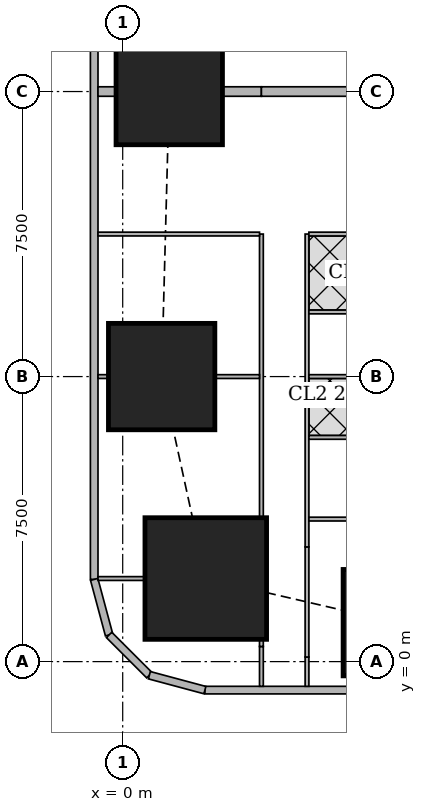
"""IFC4 building model, lengths in metres.
Left out: names, types, materials, properties, quantities, classifications, styles, units other than length and angle.
Written with IfcOpenShell. Run it as: python <this file> out.ifc"""

import sys

from ifc_helpers import new_model, si_unit, direction, frame, frame_2d, origin, origin_2d, place, context, subcontext, project, spatial, rectangle, extrude, element, fill, save


model = new_model("IFC4")
c1 = context("Model", 3, precision=1e-05, world=origin(), true_north=direction((0.0, 1.0)))
c2 = subcontext(c1, "Body", "Model", "MODEL_VIEW")
j1 = project(units=[si_unit("LENGTHUNIT", "METRE"), si_unit("PLANEANGLEUNIT", "RADIAN")], contexts=[c1])
p1 = place(None, origin())
s1 = spatial("IfcSite", under=j1, at=p1, CompositionType="ELEMENT")
p2 = place(p1, origin())
s2 = spatial("IfcBuilding", under=s1, at=p2, CompositionType="ELEMENT")
p3 = place(p2, frame((0.0, 0.0, 42.5)))
s3 = spatial("IfcBuildingStorey", under=s2, at=p3, CompositionType="ELEMENT", Elevation=42.5)
p4 = place(p3, frame((7.2, 1.025, 0.0), z_axis=(0.0, 0.0, 1.0), x_axis=(1.0, 0.0, 0.0)))
e1 = element("IfcColumn", 1, at=p4, inside=s3, PredefinedType="COLUMN", context=c2, shape_type="SweptSolid", body=[
    extrude(rectangle(XDim=2.8, YDim=2.8, at=origin_2d()), origin(), (0.0, 0.0, 1.0), 3.75),
])
p5 = place(p3, frame((2.186, 2.186, 0.0), z_axis=(0.0, 0.0, 1.0), x_axis=(1.0, 0.0, 0.0)))
e2 = element("IfcColumn", 2, at=p5, inside=s3, PredefinedType="COLUMN", context=c2, shape_type="SweptSolid", body=[
    extrude(rectangle(XDim=3.2, YDim=3.2, at=origin_2d()), origin(), (0.0, 0.0, 1.0), 3.75),
])
for number, where, z_axis, x_axis in (
    (3, (1.025, 7.5, 0.0), (0.0, 0.0, 1.0), (1.0, 0.0, 0.0)),
    (4, (1.225, 15.0, 0.0), (0.0, 0.0, 1.0), (1.0, 0.0, 0.0)),
):
    element("IfcColumn", number, at=place(p3, frame(where, z_axis=z_axis, x_axis=x_axis)), inside=s3, PredefinedType="COLUMN", context=c2, shape_type="SweptSolid", body=[
        extrude(rectangle(XDim=2.8, YDim=2.8, at=origin_2d()), origin(), (0.0, 0.0, 1.0), 3.75),
    ])
p6 = place(p3, frame((2.163, -0.75, 0.0), z_axis=(0.0, 0.0, 1.0), x_axis=(1.0, 0.0, 0.0)))
e5 = element("IfcWall", 5, at=p6, inside=s3, PredefinedType="SOLIDWALL", context=c2, shape_type="SweptSolid", body=[
    extrude(rectangle(XDim=45.628, YDim=0.2, at=frame_2d((22.814, 0.0))), origin(), (0.0, 0.0, 1.0), 3.5),
])
p7 = place(p6, frame((9.537, 0.0, 0.9)))
e6 = element("IfcOpeningElement", 6, at=p7, cuts=e5, PredefinedType="OPENING", context=c2, shape_type="SweptSolid", body=[
    extrude(rectangle(XDim=1.8, YDim=1.5, at=frame_2d((0.9, 0.75))), frame((0.0, 0.11, 0.0), z_axis=(0.0, -1.0, 0.0), x_axis=(1.0, 0.0, 0.0)), (0.0, 0.0, 1.0), 0.22),
])
p8 = place(p6, frame((13.137, 0.0, 0.9)))
e7 = element("IfcOpeningElement", 7, at=p8, cuts=e5, PredefinedType="OPENING", context=c2, shape_type="SweptSolid", body=[
    extrude(rectangle(XDim=1.8, YDim=1.5, at=frame_2d((0.9, 0.75))), frame((0.0, 0.11, 0.0), z_axis=(0.0, -1.0, 0.0), x_axis=(1.0, 0.0, 0.0)), (0.0, 0.0, 1.0), 0.22),
])
p9 = place(p6, frame((16.737, 0.0, 0.9)))
e8 = element("IfcOpeningElement", 8, at=p9, cuts=e5, PredefinedType="OPENING", context=c2, shape_type="SweptSolid", body=[
    extrude(rectangle(XDim=1.8, YDim=1.5, at=frame_2d((0.9, 0.75))), frame((0.0, 0.11, 0.0), z_axis=(0.0, -1.0, 0.0), x_axis=(1.0, 0.0, 0.0)), (0.0, 0.0, 1.0), 0.22),
])
p10 = place(p6, frame((20.337, 0.0, 0.9)))
e9 = element("IfcOpeningElement", 9, at=p10, cuts=e5, PredefinedType="OPENING", context=c2, shape_type="SweptSolid", body=[
    extrude(rectangle(XDim=1.8, YDim=1.5, at=frame_2d((0.9, 0.75))), frame((0.0, 0.11, 0.0), z_axis=(0.0, -1.0, 0.0), x_axis=(1.0, 0.0, 0.0)), (0.0, 0.0, 1.0), 0.22),
])
p11 = place(p6, frame((23.937, 0.0, 0.9)))
e10 = element("IfcOpeningElement", 10, at=p11, cuts=e5, PredefinedType="OPENING", context=c2, shape_type="SweptSolid", body=[
    extrude(rectangle(XDim=1.8, YDim=1.5, at=frame_2d((0.9, 0.75))), frame((0.0, 0.11, 0.0), z_axis=(0.0, -1.0, 0.0), x_axis=(1.0, 0.0, 0.0)), (0.0, 0.0, 1.0), 0.22),
])
p12 = place(p6, frame((27.537, 0.0, 0.9)))
e11 = element("IfcOpeningElement", 11, at=p12, cuts=e5, PredefinedType="OPENING", context=c2, shape_type="SweptSolid", body=[
    extrude(rectangle(XDim=1.8, YDim=1.5, at=frame_2d((0.9, 0.75))), frame((0.0, 0.11, 0.0), z_axis=(0.0, -1.0, 0.0), x_axis=(1.0, 0.0, 0.0)), (0.0, 0.0, 1.0), 0.22),
])
p13 = place(p6, frame((31.137, 0.0, 0.9)))
e12 = element("IfcOpeningElement", 12, at=p13, cuts=e5, PredefinedType="OPENING", context=c2, shape_type="SweptSolid", body=[
    extrude(rectangle(XDim=1.8, YDim=1.5, at=frame_2d((0.9, 0.75))), frame((0.0, 0.11, 0.0), z_axis=(0.0, -1.0, 0.0), x_axis=(1.0, 0.0, 0.0)), (0.0, 0.0, 1.0), 0.22),
])
p14 = place(p6, frame((34.737, 0.0, 0.9)))
e13 = element("IfcOpeningElement", 13, at=p14, cuts=e5, PredefinedType="OPENING", context=c2, shape_type="SweptSolid", body=[
    extrude(rectangle(XDim=1.8, YDim=1.5, at=frame_2d((0.9, 0.75))), frame((0.0, 0.11, 0.0), z_axis=(0.0, -1.0, 0.0), x_axis=(1.0, 0.0, 0.0)), (0.0, 0.0, 1.0), 0.22),
])
p15 = place(p3, frame((-0.75, 42.837, 0.0), z_axis=(0.0, 0.0, 1.0), x_axis=(0.0, -1.0, 0.0)))
e14 = element("IfcWall", 14, at=p15, inside=s3, PredefinedType="SOLIDWALL", context=c2, shape_type="SweptSolid", body=[
    extrude(rectangle(XDim=40.674, YDim=0.2, at=frame_2d((20.337, 0.0))), origin(), (0.0, 0.0, 1.0), 3.5),
])
p16 = place(p15, frame((1.78, 0.0, 0.9)))
e15 = element("IfcOpeningElement", 15, at=p16, cuts=e14, PredefinedType="OPENING", context=c2, shape_type="SweptSolid", body=[
    extrude(rectangle(XDim=1.8, YDim=1.5, at=frame_2d((0.9, 0.75))), frame((0.0, 0.11, 0.0), z_axis=(0.0, -1.0, 0.0), x_axis=(1.0, 0.0, 0.0)), (0.0, 0.0, 1.0), 0.22),
])
p17 = place(p15, frame((6.312, 0.0, 0.9)))
e16 = element("IfcOpeningElement", 16, at=p17, cuts=e14, PredefinedType="OPENING", context=c2, shape_type="SweptSolid", body=[
    extrude(rectangle(XDim=1.8, YDim=1.5, at=frame_2d((0.9, 0.75))), frame((0.0, 0.11, 0.0), z_axis=(0.0, -1.0, 0.0), x_axis=(1.0, 0.0, 0.0)), (0.0, 0.0, 1.0), 0.22),
])
p18 = place(p15, frame((10.062, 0.0, 0.9)))
e17 = element("IfcOpeningElement", 17, at=p18, cuts=e14, PredefinedType="OPENING", context=c2, shape_type="SweptSolid", body=[
    extrude(rectangle(XDim=1.8, YDim=1.5, at=frame_2d((0.9, 0.75))), frame((0.0, 0.11, 0.0), z_axis=(0.0, -1.0, 0.0), x_axis=(1.0, 0.0, 0.0)), (0.0, 0.0, 1.0), 0.22),
])
p19 = place(p15, frame((13.812, 0.0, 0.9)))
e18 = element("IfcOpeningElement", 18, at=p19, cuts=e14, PredefinedType="OPENING", context=c2, shape_type="SweptSolid", body=[
    extrude(rectangle(XDim=1.8, YDim=1.5, at=frame_2d((0.9, 0.75))), frame((0.0, 0.11, 0.0), z_axis=(0.0, -1.0, 0.0), x_axis=(1.0, 0.0, 0.0)), (0.0, 0.0, 1.0), 0.22),
])
p20 = place(p15, frame((17.562, 0.0, 0.9)))
e19 = element("IfcOpeningElement", 19, at=p20, cuts=e14, PredefinedType="OPENING", context=c2, shape_type="SweptSolid", body=[
    extrude(rectangle(XDim=1.8, YDim=1.5, at=frame_2d((0.9, 0.75))), frame((0.0, 0.11, 0.0), z_axis=(0.0, -1.0, 0.0), x_axis=(1.0, 0.0, 0.0)), (0.0, 0.0, 1.0), 0.22),
])
p21 = place(p15, frame((21.312, 0.0, 0.9)))
e20 = element("IfcOpeningElement", 20, at=p21, cuts=e14, PredefinedType="OPENING", context=c2, shape_type="SweptSolid", body=[
    extrude(rectangle(XDim=1.8, YDim=1.5, at=frame_2d((0.9, 0.75))), frame((0.0, 0.11, 0.0), z_axis=(0.0, -1.0, 0.0), x_axis=(1.0, 0.0, 0.0)), (0.0, 0.0, 1.0), 0.22),
])
p22 = place(p15, frame((25.062, 0.0, 0.9)))
e21 = element("IfcOpeningElement", 21, at=p22, cuts=e14, PredefinedType="OPENING", context=c2, shape_type="SweptSolid", body=[
    extrude(rectangle(XDim=1.8, YDim=1.5, at=frame_2d((0.9, 0.75))), frame((0.0, 0.11, 0.0), z_axis=(0.0, -1.0, 0.0), x_axis=(1.0, 0.0, 0.0)), (0.0, 0.0, 1.0), 0.22),
])
p23 = place(p15, frame((28.812, 0.0, 0.9)))
e22 = element("IfcOpeningElement", 22, at=p23, cuts=e14, PredefinedType="OPENING", context=c2, shape_type="SweptSolid", body=[
    extrude(rectangle(XDim=1.8, YDim=1.5, at=frame_2d((0.9, 0.75))), frame((0.0, 0.11, 0.0), z_axis=(0.0, -1.0, 0.0), x_axis=(1.0, 0.0, 0.0)), (0.0, 0.0, 1.0), 0.22),
])
p24 = place(p15, frame((32.562, 0.0, 0.9)))
e23 = element("IfcOpeningElement", 23, at=p24, cuts=e14, PredefinedType="OPENING", context=c2, shape_type="SweptSolid", body=[
    extrude(rectangle(XDim=1.8, YDim=1.5, at=frame_2d((0.9, 0.75))), frame((0.0, 0.11, 0.0), z_axis=(0.0, -1.0, 0.0), x_axis=(1.0, 0.0, 0.0)), (0.0, 0.0, 1.0), 0.22),
])
p25 = place(p15, frame((37.094, 0.0, 0.9)))
e24 = element("IfcOpeningElement", 24, at=p25, cuts=e14, PredefinedType="OPENING", context=c2, shape_type="SweptSolid", body=[
    extrude(rectangle(XDim=1.8, YDim=1.5, at=frame_2d((0.9, 0.75))), frame((0.0, 0.11, 0.0), z_axis=(0.0, -1.0, 0.0), x_axis=(1.0, 0.0, 0.0)), (0.0, 0.0, 1.0), 0.22),
])
p26 = place(p3, frame((-0.75, 2.163, 0.0), z_axis=(0.0, 0.0, 1.0), x_axis=(0.259168954497, -0.965832000415, 0.0)))
e25 = element("IfcWall", 25, at=p26, inside=s3, PredefinedType="SOLIDWALL", context=c2, shape_type="SweptSolid", body=[
    extrude(rectangle(XDim=1.513, YDim=0.2, at=frame_2d((0.756, 0.0))), origin(), (0.0, 0.0, 1.0), 3.5),
])
p27 = place(p3, frame((-0.358, 0.702, 0.0), z_axis=(0.0, 0.0, 1.0), x_axis=(0.707106781187, -0.707106781187, 0.0)))
e26 = element("IfcWall", 26, at=p27, inside=s3, PredefinedType="SOLIDWALL", context=c2, shape_type="SweptSolid", body=[
    extrude(rectangle(XDim=1.499, YDim=0.2, at=frame_2d((0.75, 0.0))), origin(), (0.0, 0.0, 1.0), 3.5),
])
p28 = place(p3, frame((0.702, -0.358, 0.0), z_axis=(0.0, 0.0, 1.0), x_axis=(0.965832000415, -0.259168954497, 0.0)))
e27 = element("IfcWall", 27, at=p28, inside=s3, PredefinedType="SOLIDWALL", context=c2, shape_type="SweptSolid", body=[
    extrude(rectangle(XDim=1.513, YDim=0.2, at=frame_2d((0.756, 0.0))), origin(), (0.0, 0.0, 1.0), 3.5),
])
p29 = place(p3, frame((3.65, -0.65, 0.0), z_axis=(0.0, 0.0, 1.0), x_axis=(0.0, 1.0, 0.0)))
e28 = element("IfcWall", 28, at=p29, inside=s3, PredefinedType="PARTITIONING", context=c2, shape_type="SweptSolid", body=[
    extrude(rectangle(XDim=1.048, YDim=0.1, at=frame_2d((0.524, 0.0))), origin(), (0.0, 0.0, 1.0), 3.5),
])
p30 = place(p3, frame((3.65, 0.398, 0.0), z_axis=(0.0, 0.0, 1.0), x_axis=(0.0, 1.0, 0.0)))
e29 = element("IfcWall", 29, at=p30, inside=s3, PredefinedType="PARTITIONING", context=c2, shape_type="SweptSolid", body=[
    extrude(rectangle(XDim=0.187, YDim=0.1, at=frame_2d((0.094, 0.0))), origin(), (0.0, 0.0, 1.0), 2.05),
])
p31 = place(p3, frame((3.65, 3.787, 0.0), z_axis=(0.0, 0.0, 1.0), x_axis=(0.0, 1.0, 0.0)))
e30 = element("IfcWall", 30, at=p31, inside=s3, PredefinedType="PARTITIONING", context=c2, shape_type="SweptSolid", body=[
    extrude(rectangle(XDim=7.463, YDim=0.1, at=frame_2d((3.731, 0.0))), origin(), (0.0, 0.0, 1.0), 3.5),
])
p32 = place(p31, frame((6.363, 0.0, 0.0)))
e31 = element("IfcOpeningElement", 31, at=p32, cuts=e30, PredefinedType="OPENING", context=c2, shape_type="SweptSolid", body=[
    extrude(rectangle(XDim=0.9, YDim=2.1, at=frame_2d((0.45, 1.05))), frame((0.0, 0.06, 0.0), z_axis=(0.0, -1.0, 0.0), x_axis=(1.0, 0.0, 0.0)), (0.0, 0.0, 1.0), 0.12),
])
p33 = place(p31, frame((1.4, 0.0, 0.0)))
e32 = element("IfcOpeningElement", 32, at=p33, cuts=e30, PredefinedType="OPENING", context=c2, shape_type="SweptSolid", body=[
    extrude(rectangle(XDim=0.9, YDim=2.1, at=frame_2d((0.45, 1.05))), frame((0.0, 0.06, 0.0), z_axis=(0.0, -1.0, 0.0), x_axis=(1.0, 0.0, 0.0)), (0.0, 0.0, 1.0), 0.12),
])
p34 = place(p3, frame((4.85, -0.65, 0.0), z_axis=(0.0, 0.0, 1.0), x_axis=(0.0, 1.0, 0.0)))
e33 = element("IfcWall", 33, at=p34, inside=s3, PredefinedType="PARTITIONING", context=c2, shape_type="SweptSolid", body=[
    extrude(rectangle(XDim=0.771, YDim=0.1, at=frame_2d((0.385, 0.0))), origin(), (0.0, 0.0, 1.0), 3.5),
])
p35 = place(p3, frame((4.85, 0.121, 0.0), z_axis=(0.0, 0.0, 1.0), x_axis=(0.0, 1.0, 0.0)))
e34 = element("IfcWall", 34, at=p35, inside=s3, PredefinedType="PARTITIONING", context=c2, shape_type="SweptSolid", body=[
    extrude(rectangle(XDim=2.897, YDim=0.1, at=frame_2d((1.448, 0.0))), origin(), (0.0, 0.0, 1.0), 2.05),
])
p36 = place(p3, frame((4.85, 3.018, 0.0), z_axis=(0.0, 0.0, 1.0), x_axis=(0.0, 1.0, 0.0)))
e35 = element("IfcWall", 35, at=p36, inside=s3, PredefinedType="PARTITIONING", context=c2, shape_type="SweptSolid", body=[
    extrude(rectangle(XDim=8.232, YDim=0.1, at=frame_2d((4.116, 0.0))), origin(), (0.0, 0.0, 1.0), 3.5),
])
p37 = place(p36, frame((6.757, 0.0, 0.0)))
e36 = element("IfcOpeningElement", 36, at=p37, cuts=e35, PredefinedType="OPENING", context=c2, shape_type="SweptSolid", body=[
    extrude(rectangle(XDim=0.9, YDim=2.1, at=frame_2d((0.45, 1.05))), frame((0.0, 0.06, 0.0), z_axis=(0.0, -1.0, 0.0), x_axis=(1.0, 0.0, 0.0)), (0.0, 0.0, 1.0), 0.12),
])
p38 = place(p36, frame((3.232, 0.0, 0.0)))
e37 = element("IfcOpeningElement", 37, at=p38, cuts=e35, PredefinedType="OPENING", context=c2, shape_type="SweptSolid", body=[
    extrude(rectangle(XDim=0.9, YDim=2.1, at=frame_2d((0.45, 1.05))), frame((0.0, 0.06, 0.0), z_axis=(0.0, -1.0, 0.0), x_axis=(1.0, 0.0, 0.0)), (0.0, 0.0, 1.0), 0.12),
])
p39 = place(p36, frame((4.882, 0.0, 0.0)))
e38 = element("IfcOpeningElement", 38, at=p39, cuts=e35, PredefinedType="OPENING", context=c2, shape_type="SweptSolid", body=[
    extrude(rectangle(XDim=0.9, YDim=2.1, at=frame_2d((0.45, 1.05))), frame((0.0, 0.06, 0.0), z_axis=(0.0, -1.0, 0.0), x_axis=(1.0, 0.0, 0.0)), (0.0, 0.0, 1.0), 0.12),
])
p40 = place(p36, frame((1.357, 0.0, 0.0)))
e39 = element("IfcOpeningElement", 39, at=p40, cuts=e35, PredefinedType="OPENING", context=c2, shape_type="SweptSolid", body=[
    extrude(rectangle(XDim=0.9, YDim=2.1, at=frame_2d((0.45, 1.05))), frame((0.0, 0.06, 0.0), z_axis=(0.0, -1.0, 0.0), x_axis=(1.0, 0.0, 0.0)), (0.0, 0.0, 1.0), 0.12),
])
p41 = place(p3, frame((-0.65, 2.186, 0.0), z_axis=(0.0, 0.0, 1.0), x_axis=(1.0, 0.0, 0.0)))
e40 = element("IfcWall", 40, at=p41, inside=s3, PredefinedType="PARTITIONING", context=c2, shape_type="SweptSolid", body=[
    extrude(rectangle(XDim=1.235, YDim=0.1, at=frame_2d((0.617, 0.0))), origin(), (0.0, 0.0, 1.0), 3.5),
])
p42 = place(p3, frame((-0.65, 7.5, 0.0), z_axis=(0.0, 0.0, 1.0), x_axis=(1.0, 0.0, 0.0)))
e41 = element("IfcWall", 41, at=p42, inside=s3, PredefinedType="PARTITIONING", context=c2, shape_type="SweptSolid", body=[
    extrude(rectangle(XDim=0.274, YDim=0.1, at=frame_2d((0.137, 0.0))), origin(), (0.0, 0.0, 1.0), 3.5),
])
p43 = place(p3, frame((2.426, 7.5, 0.0), z_axis=(0.0, 0.0, 1.0), x_axis=(1.0, 0.0, 0.0)))
e42 = element("IfcWall", 42, at=p43, inside=s3, PredefinedType="PARTITIONING", context=c2, shape_type="SweptSolid", body=[
    extrude(rectangle(XDim=1.174, YDim=0.1, at=frame_2d((0.587, 0.0))), origin(), (0.0, 0.0, 1.0), 2.05),
])
p44 = place(p3, frame((-0.65, 11.25, 0.0), z_axis=(0.0, 0.0, 1.0), x_axis=(1.0, 0.0, 0.0)))
e43 = element("IfcWall", 43, at=p44, inside=s3, PredefinedType="PARTITIONING", context=c2, shape_type="SweptSolid", body=[
    extrude(rectangle(XDim=4.25, YDim=0.1, at=frame_2d((2.125, 0.0))), origin(), (0.0, 0.0, 1.0), 2.05),
])
p45 = place(p3, frame((4.9, 3.75, 0.0), z_axis=(0.0, 0.0, 1.0), x_axis=(1.0, 0.0, 0.0)))
e44 = element("IfcWall", 44, at=p45, inside=s3, PredefinedType="PARTITIONING", context=c2, shape_type="SweptSolid", body=[
    extrude(rectangle(XDim=3.525, YDim=0.1, at=frame_2d((1.763, 0.0))), origin(), (0.0, 0.0, 1.0), 3.5),
])
p46 = place(p3, frame((4.9, 7.5, 0.0), z_axis=(0.0, 0.0, 1.0), x_axis=(1.0, 0.0, 0.0)))
e45 = element("IfcWall", 45, at=p46, inside=s3, PredefinedType="PARTITIONING", context=c2, shape_type="SweptSolid", body=[
    extrude(rectangle(XDim=1.399, YDim=0.1, at=frame_2d((0.7, 0.0))), origin(), (0.0, 0.0, 1.0), 3.5),
])
for number, where, z_axis, x_axis in (
    (46, (4.9, 11.25, 0.0), (0.0, 0.0, 1.0), (1.0, 0.0, 0.0)),
    (47, (4.9, 9.2, 0.0), (0.0, 0.0, 1.0), (1.0, 0.0, 0.0)),
    (48, (4.9, 5.9, 0.0), (0.0, 0.0, 1.0), (1.0, 0.0, 0.0)),
):
    element("IfcWall", number, at=place(p3, frame(where, z_axis=z_axis, x_axis=x_axis)), inside=s3, PredefinedType="PARTITIONING", context=c2, shape_type="SweptSolid", body=[
        extrude(rectangle(XDim=3.525, YDim=0.1, at=frame_2d((1.763, 0.0))), origin(), (0.0, 0.0, 1.0), 3.5),
    ])
p47 = place(p3, frame((-0.65, 15.0, 0.0), z_axis=(0.0, 0.0, 1.0), x_axis=(1.0, 0.0, 0.0)))
e49 = element("IfcWall", 49, at=p47, inside=s3, PredefinedType="SOLIDWALL", context=c2, shape_type="SweptSolid", body=[
    extrude(rectangle(XDim=0.474, YDim=0.25, at=frame_2d((0.237, 0.0))), origin(), (0.0, 0.0, 1.0), 3.5),
])
p48 = place(p3, frame((2.626, 15.0, 0.0), z_axis=(0.0, 0.0, 1.0), x_axis=(1.0, 0.0, 0.0)))
e50 = element("IfcWall", 50, at=p48, inside=s3, PredefinedType="SOLIDWALL", context=c2, shape_type="SweptSolid", body=[
    extrude(rectangle(XDim=1.024, YDim=0.25, at=frame_2d((0.512, 0.0))), origin(), (0.0, 0.0, 1.0), 3.5),
])
p49 = place(p3, frame((3.65, 15.0, 0.0), z_axis=(0.0, 0.0, 1.0), x_axis=(1.0, 0.0, 0.0)))
e51 = element("IfcWall", 51, at=p49, inside=s3, PredefinedType="SOLIDWALL", context=c2, shape_type="SweptSolid", body=[
    extrude(rectangle(XDim=2.649, YDim=0.25, at=frame_2d((1.325, 0.0))), origin(), (0.0, 0.0, 1.0), 3.5),
])
p50 = place(p22, origin())
e52 = element("IfcWindow", 52, at=p50, inside=s3, PartitioningType="SINGLE_PANEL", PredefinedType="WINDOW", context=c2, shape_type="SweptSolid", body=[
    extrude(rectangle(XDim=1.8, YDim=1.5, at=frame_2d((0.9, 0.75))), frame((0.0, 0.03, 0.0), z_axis=(0.0, -1.0, 0.0), x_axis=(1.0, 0.0, 0.0)), (0.0, 0.0, 1.0), 0.06),
])
fill(e21, e52)
p51 = place(p23, origin())
e53 = element("IfcWindow", 53, at=p51, inside=s3, PartitioningType="SINGLE_PANEL", PredefinedType="WINDOW", context=c2, shape_type="SweptSolid", body=[
    extrude(rectangle(XDim=1.8, YDim=1.5, at=frame_2d((0.9, 0.75))), frame((0.0, 0.03, 0.0), z_axis=(0.0, -1.0, 0.0), x_axis=(1.0, 0.0, 0.0)), (0.0, 0.0, 1.0), 0.06),
])
fill(e22, e53)
p52 = place(p24, origin())
e54 = element("IfcWindow", 54, at=p52, inside=s3, PartitioningType="SINGLE_PANEL", PredefinedType="WINDOW", context=c2, shape_type="SweptSolid", body=[
    extrude(rectangle(XDim=1.8, YDim=1.5, at=frame_2d((0.9, 0.75))), frame((0.0, 0.03, 0.0), z_axis=(0.0, -1.0, 0.0), x_axis=(1.0, 0.0, 0.0)), (0.0, 0.0, 1.0), 0.06),
])
fill(e23, e54)
p53 = place(p25, origin())
e55 = element("IfcWindow", 55, at=p53, inside=s3, PartitioningType="SINGLE_PANEL", PredefinedType="WINDOW", context=c2, shape_type="SweptSolid", body=[
    extrude(rectangle(XDim=1.8, YDim=1.5, at=frame_2d((0.9, 0.75))), frame((0.0, 0.03, 0.0), z_axis=(0.0, -1.0, 0.0), x_axis=(1.0, 0.0, 0.0)), (0.0, 0.0, 1.0), 0.06),
])
fill(e24, e55)
p54 = place(p32, origin())
e56 = element("IfcDoor", 56, at=p54, inside=s3, OperationType="SINGLE_SWING_RIGHT", PredefinedType="DOOR", context=c2, shape_type="SweptSolid", body=[
    extrude(rectangle(XDim=0.9, YDim=2.1, at=frame_2d((0.45, 1.05))), frame((0.0, 0.025, 0.0), z_axis=(0.0, -1.0, 0.0), x_axis=(1.0, 0.0, 0.0)), (0.0, 0.0, 1.0), 0.05),
])
fill(e31, e56)
p55 = place(p33, origin())
e57 = element("IfcDoor", 57, at=p55, inside=s3, OperationType="SINGLE_SWING_LEFT", PredefinedType="DOOR", context=c2, shape_type="SweptSolid", body=[
    extrude(rectangle(XDim=0.9, YDim=2.1, at=frame_2d((0.45, 1.05))), frame((0.0, 0.025, 0.0), z_axis=(0.0, -1.0, 0.0), x_axis=(1.0, 0.0, 0.0)), (0.0, 0.0, 1.0), 0.05),
])
fill(e32, e57)
p56 = place(p37, origin())
e58 = element("IfcDoor", 58, at=p56, inside=s3, OperationType="SINGLE_SWING_LEFT", PredefinedType="DOOR", context=c2, shape_type="SweptSolid", body=[
    extrude(rectangle(XDim=0.9, YDim=2.1, at=frame_2d((0.45, 1.05))), frame((0.0, 0.025, 0.0), z_axis=(0.0, -1.0, 0.0), x_axis=(1.0, 0.0, 0.0)), (0.0, 0.0, 1.0), 0.05),
])
fill(e36, e58)
p57 = place(p38, origin())
e59 = element("IfcDoor", 59, at=p57, inside=s3, OperationType="SINGLE_SWING_LEFT", PredefinedType="DOOR", context=c2, shape_type="SweptSolid", body=[
    extrude(rectangle(XDim=0.9, YDim=2.1, at=frame_2d((0.45, 1.05))), frame((0.0, 0.025, 0.0), z_axis=(0.0, -1.0, 0.0), x_axis=(1.0, 0.0, 0.0)), (0.0, 0.0, 1.0), 0.05),
])
fill(e37, e59)
p58 = place(p39, origin())
e60 = element("IfcDoor", 60, at=p58, inside=s3, OperationType="SINGLE_SWING_LEFT", PredefinedType="DOOR", context=c2, shape_type="SweptSolid", body=[
    extrude(rectangle(XDim=0.9, YDim=2.1, at=frame_2d((0.45, 1.05))), frame((0.0, 0.025, 0.0), z_axis=(0.0, -1.0, 0.0), x_axis=(1.0, 0.0, 0.0)), (0.0, 0.0, 1.0), 0.05),
])
fill(e38, e60)
p59 = place(p40, origin())
e61 = element("IfcDoor", 61, at=p59, inside=s3, OperationType="SINGLE_SWING_RIGHT", PredefinedType="DOOR", context=c2, shape_type="SweptSolid", body=[
    extrude(rectangle(XDim=0.9, YDim=2.1, at=frame_2d((0.45, 1.05))), frame((0.0, 0.025, 0.0), z_axis=(0.0, -1.0, 0.0), x_axis=(1.0, 0.0, 0.0)), (0.0, 0.0, 1.0), 0.05),
])
fill(e39, e61)
save(model, sys.argv[1])
